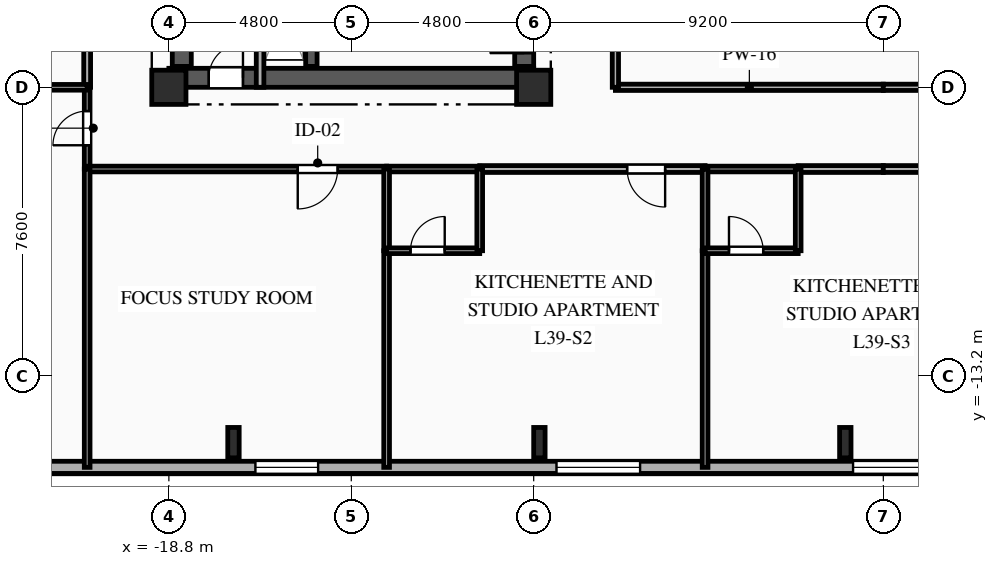
"""IFC4 building model, lengths in metres.
Left out: names, types, materials, properties, quantities, classifications, styles, units other than length and angle.
Written with IfcOpenShell. Run it as: python <this file> out.ifc"""

import sys

from ifc_helpers import new_model, si_unit, direction, frame, frame_2d, origin, origin_2d, place, context, subcontext, project, spatial, rectangle, i_section, extrude, element, fill, save


model = new_model("IFC4")
c1 = context("Model", 3, precision=1e-05, world=origin(), true_north=direction((0.0, 1.0)))
c2 = subcontext(c1, "Body", "Model", "MODEL_VIEW")
j1 = project(units=[si_unit("LENGTHUNIT", "METRE"), si_unit("PLANEANGLEUNIT", "RADIAN")], contexts=[c1])
p1 = place(None, origin())
s1 = spatial("IfcSite", under=j1, at=p1, CompositionType="ELEMENT")
p2 = place(p1, origin())
s2 = spatial("IfcBuilding", under=s1, at=p2, CompositionType="ELEMENT")
p3 = place(p2, frame((0.0, 0.0, 141.05)))
s3 = spatial("IfcBuildingStorey", under=s2, at=p3, CompositionType="ELEMENT", Elevation=141.05)
for number, where, z_axis, x_axis in (
    (1, (-18.8, -5.6, 0.0), (0.0, 0.0, 1.0), (1.0, 0.0, 0.0)),
    (2, (-9.2, -5.6, 0.0), (0.0, 0.0, 1.0), (1.0, 0.0, 0.0)),
):
    element("IfcColumn", number, at=place(p3, frame(where, z_axis=z_axis, x_axis=x_axis)), inside=s3, PredefinedType="COLUMN", context=c2, shape_type="SweptSolid", body=[
        extrude(rectangle(XDim=0.9, YDim=0.9, at=origin_2d()), origin(), (0.0, 0.0, 1.0), 3.35),
    ])
for number, where, z_axis, x_axis in (
    (3, (-17.1, -14.95, 0.0), (0.0, 0.0, 1.0), (1.0, 0.0, 0.0)),
    (4, (-9.05, -14.95, 0.0), (0.0, 0.0, 1.0), (1.0, 0.0, 0.0)),
    (5, (-1.0, -14.95, 0.0), (0.0, 0.0, 1.0), (1.0, 0.0, 0.0)),
):
    element("IfcColumn", number, at=place(p3, frame(where, z_axis=z_axis, x_axis=x_axis)), inside=s3, PredefinedType="COLUMN", context=c2, shape_type="SweptSolid", body=[
        extrude(i_section(OverallWidth=0.3, OverallDepth=0.8, WebThickness=0.018, FlangeThickness=0.033, FilletRadius=0.03, at=origin_2d()), origin(), (0.0, 0.0, 1.0), 3.35),
    ])
p4 = place(p3, frame((23.8, -15.6, 0.0), z_axis=(0.0, 0.0, 1.0), x_axis=(-1.0, 0.0, 0.0)))
e6 = element("IfcWall", 6, at=p4, inside=s3, PredefinedType="SOLIDWALL", context=c2, shape_type="SweptSolid", body=[
    extrude(rectangle(XDim=49.6, YDim=0.32, at=frame_2d((24.8, 0.0))), origin(), (0.0, 0.0, 1.0), 3.04),
])
p5 = place(p4, frame((1.13, 0.0, 0.85)))
e7 = element("IfcOpeningElement", 7, at=p5, cuts=e6, PredefinedType="OPENING", context=c2, shape_type="SweptSolid", body=[
    extrude(rectangle(XDim=1.1, YDim=1.85, at=frame_2d((0.55, 0.925))), frame((0.0, 0.17, 0.0), z_axis=(0.0, -1.0, 0.0), x_axis=(1.0, 0.0, 0.0)), (0.0, 0.0, 1.0), 0.34),
])
p6 = place(p4, frame((6.495, 0.0, 0.85)))
e8 = element("IfcOpeningElement", 8, at=p6, cuts=e6, PredefinedType="OPENING", context=c2, shape_type="SweptSolid", body=[
    extrude(rectangle(XDim=1.65, YDim=1.85, at=frame_2d((0.825, 0.925))), frame((0.0, 0.17, 0.0), z_axis=(0.0, -1.0, 0.0), x_axis=(1.0, 0.0, 0.0)), (0.0, 0.0, 1.0), 0.34),
])
p7 = place(p4, frame((13.996, 0.0, 0.85)))
e9 = element("IfcOpeningElement", 9, at=p7, cuts=e6, PredefinedType="OPENING", context=c2, shape_type="SweptSolid", body=[
    extrude(rectangle(XDim=2.2, YDim=1.85, at=frame_2d((1.1, 0.925))), frame((0.0, 0.17, 0.0), z_axis=(0.0, -1.0, 0.0), x_axis=(1.0, 0.0, 0.0)), (0.0, 0.0, 1.0), 0.34),
])
p8 = place(p4, frame((22.396, 0.0, 0.85)))
e10 = element("IfcOpeningElement", 10, at=p8, cuts=e6, PredefinedType="OPENING", context=c2, shape_type="SweptSolid", body=[
    extrude(rectangle(XDim=2.2, YDim=1.85, at=frame_2d((1.1, 0.925))), frame((0.0, 0.17, 0.0), z_axis=(0.0, -1.0, 0.0), x_axis=(1.0, 0.0, 0.0)), (0.0, 0.0, 1.0), 0.34),
])
p9 = place(p4, frame((30.2, 0.0, 0.85)))
e11 = element("IfcOpeningElement", 11, at=p9, cuts=e6, PredefinedType="OPENING", context=c2, shape_type="SweptSolid", body=[
    extrude(rectangle(XDim=2.2, YDim=1.85, at=frame_2d((1.1, 0.925))), frame((0.0, 0.17, 0.0), z_axis=(0.0, -1.0, 0.0), x_axis=(1.0, 0.0, 0.0)), (0.0, 0.0, 1.0), 0.34),
])
p10 = place(p4, frame((38.673, 0.0, 0.85)))
e12 = element("IfcOpeningElement", 12, at=p10, cuts=e6, PredefinedType="OPENING", context=c2, shape_type="SweptSolid", body=[
    extrude(rectangle(XDim=1.65, YDim=1.85, at=frame_2d((0.825, 0.925))), frame((0.0, 0.17, 0.0), z_axis=(0.0, -1.0, 0.0), x_axis=(1.0, 0.0, 0.0)), (0.0, 0.0, 1.0), 0.34),
])
p11 = place(p4, frame((46.175, 0.0, 0.85)))
e13 = element("IfcOpeningElement", 13, at=p11, cuts=e6, PredefinedType="OPENING", context=c2, shape_type="SweptSolid", body=[
    extrude(rectangle(XDim=1.65, YDim=1.85, at=frame_2d((0.825, 0.925))), frame((0.0, 0.17, 0.0), z_axis=(0.0, -1.0, 0.0), x_axis=(1.0, 0.0, 0.0)), (0.0, 0.0, 1.0), 0.34),
])
p12 = place(p3, frame((-18.8, -5.35, 0.0), z_axis=(0.0, 0.0, 1.0), x_axis=(1.0, 0.0, 0.0)))
e14 = element("IfcWall", 14, at=p12, inside=s3, PredefinedType="SHEAR", context=c2, shape_type="SweptSolid", body=[
    extrude(rectangle(XDim=9.6, YDim=0.5, at=frame_2d((4.8, 0.0))), origin(), (0.0, 0.0, 1.0), 3.04),
])
p13 = place(p12, frame((1.05, 0.0, 0.0)))
e15 = element("IfcOpeningElement", 15, at=p13, cuts=e14, PredefinedType="OPENING", context=c2, shape_type="SweptSolid", body=[
    extrude(rectangle(XDim=0.9, YDim=2.1, at=frame_2d((0.45, 1.05))), frame((0.0, 0.26, 0.0), z_axis=(0.0, -1.0, 0.0), x_axis=(1.0, 0.0, 0.0)), (0.0, 0.0, 1.0), 0.52),
])
p14 = place(p3, frame((-18.46, -5.05, 0.0), z_axis=(0.0, 0.0, 1.0), x_axis=(0.0, 1.0, 0.0)))
e16 = element("IfcWall", 16, at=p14, inside=s3, PredefinedType="SHEAR", context=c2, shape_type="SweptSolid", body=[
    extrude(rectangle(XDim=10.1, YDim=0.5, at=frame_2d((5.05, 0.0))), origin(), (0.0, 0.0, 1.0), 3.04),
])
p15 = place(p3, frame((-9.45, -5.05, 0.0), z_axis=(0.0, 0.0, 1.0), x_axis=(0.0, 1.0, 0.0)))
e17 = element("IfcWall", 17, at=p15, inside=s3, PredefinedType="SHEAR", context=c2, shape_type="SweptSolid", body=[
    extrude(rectangle(XDim=10.1, YDim=0.5, at=frame_2d((5.05, 0.0))), origin(), (0.0, 0.0, 1.0), 3.04),
])
p16 = place(p15, frame((7.15, 0.0, 0.0)))
e18 = element("IfcOpeningElement", 18, at=p16, cuts=e17, PredefinedType="OPENING", context=c2, shape_type="SweptSolid", body=[
    extrude(rectangle(XDim=0.9, YDim=2.1, at=frame_2d((0.45, 1.05))), frame((0.0, 0.26, 0.0), z_axis=(0.0, -1.0, 0.0), x_axis=(1.0, 0.0, 0.0)), (0.0, 0.0, 1.0), 0.52),
])
p17 = place(p15, frame((2.4, 0.0, 0.0)))
e19 = element("IfcOpeningElement", 19, at=p17, cuts=e17, PredefinedType="OPENING", context=c2, shape_type="SweptSolid", body=[
    extrude(rectangle(XDim=1.2, YDim=2.15, at=frame_2d((0.6, 1.075))), frame((0.0, 0.26, 0.0), z_axis=(0.0, -1.0, 0.0), x_axis=(1.0, 0.0, 0.0)), (0.0, 0.0, 1.0), 0.52),
])
p18 = place(p15, frame((0.35, 0.0, 0.0)))
e20 = element("IfcOpeningElement", 20, at=p18, cuts=e17, PredefinedType="OPENING", context=c2, shape_type="SweptSolid", body=[
    extrude(rectangle(XDim=0.9, YDim=2.1, at=frame_2d((0.45, 1.05))), frame((0.0, 0.26, 0.0), z_axis=(0.0, -1.0, 0.0), x_axis=(1.0, 0.0, 0.0)), (0.0, 0.0, 1.0), 0.52),
])
p19 = place(p15, frame((5.0, 0.0, 0.0)))
e21 = element("IfcOpeningElement", 21, at=p19, cuts=e17, PredefinedType="OPENING", context=c2, shape_type="SweptSolid", body=[
    extrude(rectangle(XDim=0.9, YDim=2.1, at=frame_2d((0.45, 1.05))), frame((0.0, 0.26, 0.0), z_axis=(0.0, -1.0, 0.0), x_axis=(1.0, 0.0, 0.0)), (0.0, 0.0, 1.0), 0.52),
])
p20 = place(p3, frame((-15.05, -5.05, 0.0), z_axis=(0.0, 0.0, 1.0), x_axis=(0.0, 1.0, 0.0)))
e22 = element("IfcWall", 22, at=p20, inside=s3, PredefinedType="SHEAR", context=c2, shape_type="SweptSolid", body=[
    extrude(rectangle(XDim=10.1, YDim=0.3, at=frame_2d((5.05, 0.0))), origin(), (0.0, 0.0, 1.0), 3.04),
])
p21 = place(p3, frame((-16.4, -5.6, 0.0), z_axis=(0.0, 0.0, 1.0), x_axis=(0.0, 1.0, 0.0)))
e23 = element("IfcWall", 23, at=p21, inside=s3, PredefinedType="PARTITIONING", context=c2, shape_type="SweptSolid", body=[
    extrude(rectangle(XDim=3.49, YDim=0.2, at=frame_2d((1.745, 0.0))), origin(), (0.0, 0.0, 1.0), 3.04),
])
p22 = place(p3, frame((-20.95, -7.75, 0.0), z_axis=(0.0, 0.0, 1.0), x_axis=(0.0, 1.0, 0.0)))
e24 = element("IfcWall", 24, at=p22, inside=s3, PredefinedType="PARTITIONING", context=c2, shape_type="SweptSolid", body=[
    extrude(rectangle(XDim=2.15, YDim=0.15, at=frame_2d((1.075, 0.0))), origin(), (0.0, 0.0, 1.0), 3.04),
])
p23 = place(p22, frame((0.625, 0.0, 0.0)))
e25 = element("IfcOpeningElement", 25, at=p23, cuts=e24, PredefinedType="OPENING", context=c2, shape_type="SweptSolid", body=[
    extrude(rectangle(XDim=0.9, YDim=2.1, at=frame_2d((0.45, 1.05))), frame((0.0, 0.085, 0.0), z_axis=(0.0, -1.0, 0.0), x_axis=(1.0, 0.0, 0.0)), (0.0, 0.0, 1.0), 0.17),
])
p24 = place(p3, frame((-13.07, -7.75, 0.0), z_axis=(0.0, 0.0, 1.0), x_axis=(-1.0, 0.0, 0.0)))
e26 = element("IfcWall", 26, at=p24, inside=s3, PredefinedType="PARTITIONING", context=c2, shape_type="SweptSolid", body=[
    extrude(rectangle(XDim=7.88, YDim=0.15, at=frame_2d((3.94, 0.0))), origin(), (0.0, 0.0, 1.0), 3.04),
])
p25 = place(p24, frame((1.289, 0.0, 0.0)))
e27 = element("IfcOpeningElement", 27, at=p25, cuts=e26, PredefinedType="OPENING", context=c2, shape_type="SweptSolid", body=[
    extrude(rectangle(XDim=1.05, YDim=2.15, at=frame_2d((0.525, 1.075))), frame((0.0, 0.085, 0.0), z_axis=(0.0, -1.0, 0.0), x_axis=(1.0, 0.0, 0.0)), (0.0, 0.0, 1.0), 0.17),
])
p26 = place(p3, frame((-4.69, -7.75, 0.0), z_axis=(0.0, 0.0, 1.0), x_axis=(-1.0, 0.0, 0.0)))
e28 = element("IfcWall", 28, at=p26, inside=s3, PredefinedType="PARTITIONING", context=c2, shape_type="SweptSolid", body=[
    extrude(rectangle(XDim=5.93, YDim=0.18, at=frame_2d((2.965, 0.0))), origin(), (0.0, 0.0, 1.0), 3.04),
])
p27 = place(p26, frame((1.051, 0.0, 0.0)))
e29 = element("IfcOpeningElement", 29, at=p27, cuts=e28, PredefinedType="OPENING", context=c2, shape_type="SweptSolid", body=[
    extrude(rectangle(XDim=1.0, YDim=2.15, at=frame_2d((0.5, 1.075))), frame((0.0, 0.1, 0.0), z_axis=(0.0, -1.0, 0.0), x_axis=(1.0, 0.0, 0.0)), (0.0, 0.0, 1.0), 0.2),
])
p28 = place(p3, frame((-10.62, -7.75, 0.0), z_axis=(0.0, 0.0, 1.0), x_axis=(-1.0, 0.0, 0.0)))
e30 = element("IfcWall", 30, at=p28, inside=s3, PredefinedType="PLUMBINGWALL", context=c2, shape_type="SweptSolid", body=[
    extrude(rectangle(XDim=2.45, YDim=0.15, at=frame_2d((1.225, 0.0))), origin(), (0.0, 0.0, 1.0), 3.04),
])
p29 = place(p3, frame((0.0, -7.75, 0.0), z_axis=(0.0, 0.0, 1.0), x_axis=(-1.0, 0.0, 0.0)))
e31 = element("IfcWall", 31, at=p29, inside=s3, PredefinedType="PARTITIONING", context=c2, shape_type="SweptSolid", body=[
    extrude(rectangle(XDim=2.24, YDim=0.18, at=frame_2d((1.12, 0.0))), origin(), (0.0, 0.0, 1.0), 3.04),
])
p30 = place(p3, frame((-2.24, -7.75, 0.0), z_axis=(0.0, 0.0, 1.0), x_axis=(-1.0, 0.0, 0.0)))
e32 = element("IfcWall", 32, at=p30, inside=s3, PredefinedType="PLUMBINGWALL", context=c2, shape_type="SweptSolid", body=[
    extrude(rectangle(XDim=2.45, YDim=0.15, at=frame_2d((1.225, 0.0))), origin(), (0.0, 0.0, 1.0), 3.04),
])
p31 = place(p3, frame((-7.05, -5.6, 0.0), z_axis=(0.0, 0.0, 1.0), x_axis=(1.0, 0.0, 0.0)))
e33 = element("IfcWall", 33, at=p31, inside=s3, PredefinedType="PARTITIONING", context=c2, shape_type="SweptSolid", body=[
    extrude(rectangle(XDim=7.05, YDim=0.165, at=frame_2d((3.525, 0.0))), origin(), (0.0, 0.0, 1.0), 2.525),
])
p32 = place(p3, frame((3.69, -7.75, 0.0), z_axis=(0.0, 0.0, 1.0), x_axis=(-1.0, 0.0, 0.0)))
e34 = element("IfcWall", 34, at=p32, inside=s3, PredefinedType="PARTITIONING", context=c2, shape_type="SweptSolid", body=[
    extrude(rectangle(XDim=3.69, YDim=0.18, at=frame_2d((1.845, 0.0))), origin(), (0.0, 0.0, 1.0), 3.04),
])
p33 = place(p32, frame((1.536, 0.0, 0.0)))
e35 = element("IfcOpeningElement", 35, at=p33, cuts=e34, PredefinedType="OPENING", context=c2, shape_type="SweptSolid", body=[
    extrude(rectangle(XDim=1.0, YDim=2.15, at=frame_2d((0.5, 1.075))), frame((0.0, 0.1, 0.0), z_axis=(0.0, -1.0, 0.0), x_axis=(1.0, 0.0, 0.0)), (0.0, 0.0, 1.0), 0.2),
])
p34 = place(p3, frame((0.0, -5.6, 0.0), z_axis=(0.0, 0.0, 1.0), x_axis=(1.0, 0.0, 0.0)))
e36 = element("IfcWall", 36, at=p34, inside=s3, PredefinedType="PARTITIONING", context=c2, shape_type="SweptSolid", body=[
    extrude(rectangle(XDim=7.05, YDim=0.165, at=frame_2d((3.525, 0.0))), origin(), (0.0, 0.0, 1.0), 2.525),
])
p35 = place(p3, frame((-20.95, -5.6, 0.0), z_axis=(0.0, 0.0, 1.0), x_axis=(0.0, 1.0, 0.0)))
e37 = element("IfcWall", 37, at=p35, inside=s3, PredefinedType="PARTITIONING", context=c2, shape_type="SweptSolid", body=[
    extrude(rectangle(XDim=14.1, YDim=0.18, at=frame_2d((7.05, 0.0))), origin(), (0.0, 0.0, 1.0), 3.04),
])
p36 = place(p35, frame((5.058, 0.0, 0.0)))
e38 = element("IfcOpeningElement", 38, at=p36, cuts=e37, PredefinedType="OPENING", context=c2, shape_type="SweptSolid", body=[
    extrude(rectangle(XDim=1.0, YDim=2.15, at=frame_2d((0.5, 1.075))), frame((0.0, 0.1, 0.0), z_axis=(0.0, -1.0, 0.0), x_axis=(1.0, 0.0, 0.0)), (0.0, 0.0, 1.0), 0.2),
])
p37 = place(p3, frame((-7.05, -2.95, 0.0), z_axis=(0.0, 0.0, 1.0), x_axis=(0.0, -1.0, 0.0)))
e39 = element("IfcWall", 39, at=p37, inside=s3, PredefinedType="PARTITIONING", context=c2, shape_type="SweptSolid", body=[
    extrude(rectangle(XDim=2.65, YDim=0.165, at=frame_2d((1.325, 0.0))), origin(), (0.0, 0.0, 1.0), 3.04),
])
p38 = place(p3, frame((-20.95, -5.6, 0.0), z_axis=(0.0, 0.0, 1.0), x_axis=(-1.0, 0.0, 0.0)))
e40 = element("IfcWall", 40, at=p38, inside=s3, PredefinedType="PARTITIONING", context=c2, shape_type="SweptSolid", body=[
    extrude(rectangle(XDim=2.65, YDim=0.15, at=frame_2d((1.325, 0.0))), origin(), (0.0, 0.0, 1.0), 3.04),
])
p39 = place(p38, frame((0.965, 0.0, 0.0)))
e41 = element("IfcOpeningElement", 41, at=p39, cuts=e40, PredefinedType="OPENING", context=c2, shape_type="SweptSolid", body=[
    extrude(rectangle(XDim=1.05, YDim=2.15, at=frame_2d((0.525, 1.075))), frame((0.0, 0.085, 0.0), z_axis=(0.0, -1.0, 0.0), x_axis=(1.0, 0.0, 0.0)), (0.0, 0.0, 1.0), 0.17),
])
p40 = place(p3, frame((-20.95, -7.75, 0.0), z_axis=(0.0, 0.0, 1.0), x_axis=(0.0, -1.0, 0.0)))
e42 = element("IfcWall", 42, at=p40, inside=s3, PredefinedType="PARTITIONING", context=c2, shape_type="SweptSolid", body=[
    extrude(rectangle(XDim=7.85, YDim=0.15, at=frame_2d((3.925, 0.0))), origin(), (0.0, 0.0, 1.0), 3.04),
])
p41 = place(p3, frame((-13.07, -9.9, 0.0), z_axis=(0.0, 0.0, 1.0), x_axis=(0.0, -1.0, 0.0)))
e43 = element("IfcWall", 43, at=p41, inside=s3, PredefinedType="PARTITIONING", context=c2, shape_type="SweptSolid", body=[
    extrude(rectangle(XDim=5.7, YDim=0.15, at=frame_2d((2.85, 0.0))), origin(), (0.0, 0.0, 1.0), 3.04),
])
p42 = place(p3, frame((-13.07, -7.75, 0.0), z_axis=(0.0, 0.0, 1.0), x_axis=(0.0, -1.0, 0.0)))
e44 = element("IfcWall", 44, at=p42, inside=s3, PredefinedType="PLUMBINGWALL", context=c2, shape_type="SweptSolid", body=[
    extrude(rectangle(XDim=2.15, YDim=0.15, at=frame_2d((1.075, 0.0))), origin(), (0.0, 0.0, 1.0), 3.04),
])
p43 = place(p3, frame((-13.07, -9.9, 0.0), z_axis=(0.0, 0.0, 1.0), x_axis=(1.0, 0.0, 0.0)))
e45 = element("IfcWall", 45, at=p43, inside=s3, PredefinedType="PLUMBINGWALL", context=c2, shape_type="SweptSolid", body=[
    extrude(rectangle(XDim=2.45, YDim=0.15, at=frame_2d((1.225, 0.0))), origin(), (0.0, 0.0, 1.0), 3.04),
])
p44 = place(p43, frame((0.629, 0.0, 0.0)))
e46 = element("IfcOpeningElement", 46, at=p44, cuts=e45, PredefinedType="OPENING", context=c2, shape_type="SweptSolid", body=[
    extrude(rectangle(XDim=0.9, YDim=2.1, at=frame_2d((0.45, 1.05))), frame((0.0, 0.085, 0.0), z_axis=(0.0, -1.0, 0.0), x_axis=(1.0, 0.0, 0.0)), (0.0, 0.0, 1.0), 0.17),
])
p45 = place(p3, frame((-10.62, -9.9, 0.0), z_axis=(0.0, 0.0, 1.0), x_axis=(0.0, 1.0, 0.0)))
e47 = element("IfcWall", 47, at=p45, inside=s3, PredefinedType="PLUMBINGWALL", context=c2, shape_type="SweptSolid", body=[
    extrude(rectangle(XDim=2.15, YDim=0.15, at=frame_2d((1.075, 0.0))), origin(), (0.0, 0.0, 1.0), 3.04),
])
p46 = place(p3, frame((-4.69, -9.9, 0.0), z_axis=(0.0, 0.0, 1.0), x_axis=(0.0, -1.0, 0.0)))
e48 = element("IfcWall", 48, at=p46, inside=s3, PredefinedType="PARTITIONING", context=c2, shape_type="SweptSolid", body=[
    extrude(rectangle(XDim=5.7, YDim=0.15, at=frame_2d((2.85, 0.0))), origin(), (0.0, 0.0, 1.0), 3.04),
])
p47 = place(p3, frame((-4.69, -7.75, 0.0), z_axis=(0.0, 0.0, 1.0), x_axis=(0.0, -1.0, 0.0)))
e49 = element("IfcWall", 49, at=p47, inside=s3, PredefinedType="PLUMBINGWALL", context=c2, shape_type="SweptSolid", body=[
    extrude(rectangle(XDim=2.15, YDim=0.15, at=frame_2d((1.075, 0.0))), origin(), (0.0, 0.0, 1.0), 3.04),
])
p48 = place(p3, frame((-4.69, -9.9, 0.0), z_axis=(0.0, 0.0, 1.0), x_axis=(1.0, 0.0, 0.0)))
e50 = element("IfcWall", 50, at=p48, inside=s3, PredefinedType="PLUMBINGWALL", context=c2, shape_type="SweptSolid", body=[
    extrude(rectangle(XDim=2.45, YDim=0.15, at=frame_2d((1.225, 0.0))), origin(), (0.0, 0.0, 1.0), 3.04),
])
p49 = place(p48, frame((0.629, 0.0, 0.0)))
e51 = element("IfcOpeningElement", 51, at=p49, cuts=e50, PredefinedType="OPENING", context=c2, shape_type="SweptSolid", body=[
    extrude(rectangle(XDim=0.9, YDim=2.1, at=frame_2d((0.45, 1.05))), frame((0.0, 0.085, 0.0), z_axis=(0.0, -1.0, 0.0), x_axis=(1.0, 0.0, 0.0)), (0.0, 0.0, 1.0), 0.17),
])
p50 = place(p3, frame((-2.24, -9.9, 0.0), z_axis=(0.0, 0.0, 1.0), x_axis=(0.0, 1.0, 0.0)))
e52 = element("IfcWall", 52, at=p50, inside=s3, PredefinedType="PLUMBINGWALL", context=c2, shape_type="SweptSolid", body=[
    extrude(rectangle(XDim=2.15, YDim=0.15, at=frame_2d((1.075, 0.0))), origin(), (0.0, 0.0, 1.0), 3.04),
])
p51 = place(p8, origin())
e53 = element("IfcWindow", 53, at=p51, inside=s3, PartitioningType="SINGLE_PANEL", PredefinedType="WINDOW", context=c2, shape_type="SweptSolid", body=[
    extrude(rectangle(XDim=2.2, YDim=1.85, at=frame_2d((1.1, 0.925))), frame((0.0, 0.03, 0.0), z_axis=(0.0, -1.0, 0.0), x_axis=(1.0, 0.0, 0.0)), (0.0, 0.0, 1.0), 0.06),
])
fill(e10, e53)
p52 = place(p9, origin())
e54 = element("IfcWindow", 54, at=p52, inside=s3, PartitioningType="SINGLE_PANEL", PredefinedType="WINDOW", context=c2, shape_type="SweptSolid", body=[
    extrude(rectangle(XDim=2.2, YDim=1.85, at=frame_2d((1.1, 0.925))), frame((0.0, 0.03, 0.0), z_axis=(0.0, -1.0, 0.0), x_axis=(1.0, 0.0, 0.0)), (0.0, 0.0, 1.0), 0.06),
])
fill(e11, e54)
p53 = place(p10, origin())
e55 = element("IfcWindow", 55, at=p53, inside=s3, PartitioningType="SINGLE_PANEL", PredefinedType="WINDOW", context=c2, shape_type="SweptSolid", body=[
    extrude(rectangle(XDim=1.65, YDim=1.85, at=frame_2d((0.825, 0.925))), frame((0.0, 0.03, 0.0), z_axis=(0.0, -1.0, 0.0), x_axis=(1.0, 0.0, 0.0)), (0.0, 0.0, 1.0), 0.06),
])
fill(e12, e55)
p54 = place(p13, origin())
e56 = element("IfcDoor", 56, at=p54, inside=s3, OperationType="SINGLE_SWING_RIGHT", PredefinedType="DOOR", context=c2, shape_type="SweptSolid", body=[
    extrude(rectangle(XDim=0.9, YDim=2.1, at=frame_2d((0.45, 1.05))), frame((0.0, 0.025, 0.0), z_axis=(0.0, -1.0, 0.0), x_axis=(1.0, 0.0, 0.0)), (0.0, 0.0, 1.0), 0.05),
])
fill(e15, e56)
p55 = place(p18, origin())
e57 = element("IfcDoor", 57, at=p55, inside=s3, OperationType="SINGLE_SWING_LEFT", PredefinedType="DOOR", context=c2, shape_type="SweptSolid", body=[
    extrude(rectangle(XDim=0.9, YDim=2.1, at=frame_2d((0.45, 1.05))), frame((0.0, 0.025, 0.0), z_axis=(0.0, -1.0, 0.0), x_axis=(1.0, 0.0, 0.0)), (0.0, 0.0, 1.0), 0.05),
])
fill(e20, e57)
p56 = place(p23, origin())
e58 = element("IfcDoor", 58, at=p56, inside=s3, OperationType="SINGLE_SWING_LEFT", PredefinedType="DOOR", context=c2, shape_type="SweptSolid", body=[
    extrude(rectangle(XDim=0.9, YDim=2.1, at=frame_2d((0.45, 1.05))), frame((0.0, 0.025, 0.0), z_axis=(0.0, -1.0, 0.0), x_axis=(1.0, 0.0, 0.0)), (0.0, 0.0, 1.0), 0.05),
])
fill(e25, e58)
p57 = place(p25, origin())
e59 = element("IfcDoor", 59, at=p57, inside=s3, OperationType="SINGLE_SWING_RIGHT", PredefinedType="DOOR", context=c2, shape_type="SweptSolid", body=[
    extrude(rectangle(XDim=1.05, YDim=2.15, at=frame_2d((0.525, 1.075))), frame((0.0, 0.025, 0.0), z_axis=(0.0, -1.0, 0.0), x_axis=(1.0, 0.0, 0.0)), (0.0, 0.0, 1.0), 0.05),
])
fill(e27, e59)
p58 = place(p27, origin())
e60 = element("IfcDoor", 60, at=p58, inside=s3, OperationType="SINGLE_SWING_LEFT", PredefinedType="DOOR", context=c2, shape_type="SweptSolid", body=[
    extrude(rectangle(XDim=1.0, YDim=2.15, at=frame_2d((0.5, 1.075))), frame((0.0, 0.025, 0.0), z_axis=(0.0, -1.0, 0.0), x_axis=(1.0, 0.0, 0.0)), (0.0, 0.0, 1.0), 0.05),
])
fill(e29, e60)
p59 = place(p44, origin())
e61 = element("IfcDoor", 61, at=p59, inside=s3, OperationType="SINGLE_SWING_RIGHT", PredefinedType="DOOR", context=c2, shape_type="SweptSolid", body=[
    extrude(rectangle(XDim=0.9, YDim=2.1, at=frame_2d((0.45, 1.05))), frame((0.0, 0.025, 0.0), z_axis=(0.0, -1.0, 0.0), x_axis=(1.0, 0.0, 0.0)), (0.0, 0.0, 1.0), 0.05),
])
fill(e46, e61)
p60 = place(p49, origin())
e62 = element("IfcDoor", 62, at=p60, inside=s3, OperationType="SINGLE_SWING_LEFT", PredefinedType="DOOR", context=c2, shape_type="SweptSolid", body=[
    extrude(rectangle(XDim=0.9, YDim=2.1, at=frame_2d((0.45, 1.05))), frame((0.0, 0.025, 0.0), z_axis=(0.0, -1.0, 0.0), x_axis=(1.0, 0.0, 0.0)), (0.0, 0.0, 1.0), 0.05),
])
fill(e51, e62)
save(model, sys.argv[1])
